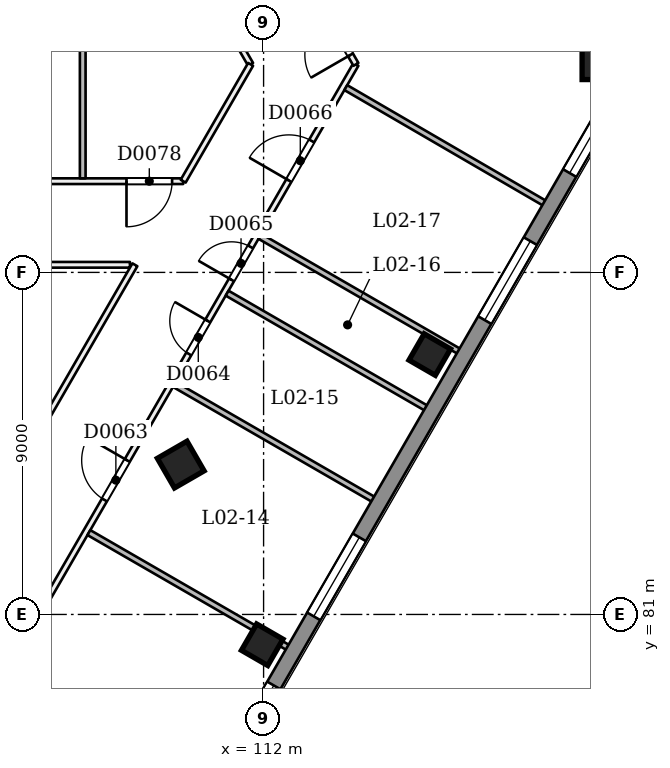
"""IFC4 building model, lengths in metres.
Left out: names, types, materials, properties, quantities, classifications, styles, units other than length and angle.
Written with IfcOpenShell. Run it as: python <this file> out.ifc"""

import sys

from ifc_helpers import new_model, si_unit, direction, frame, frame_2d, origin, origin_2d, place, context, subcontext, project, spatial, rectangle, extrude, element, fill, save


model = new_model("IFC4")
c1 = context("Model", 3, precision=1e-05, world=origin(), true_north=direction((0.0, 1.0)))
c2 = subcontext(c1, "Body", "Model", "MODEL_VIEW")
j1 = project(units=[si_unit("LENGTHUNIT", "METRE"), si_unit("PLANEANGLEUNIT", "RADIAN")], contexts=[c1])
p1 = place(None, origin())
s1 = spatial("IfcSite", under=j1, at=p1, CompositionType="ELEMENT")
p2 = place(p1, origin())
s2 = spatial("IfcBuilding", under=s1, at=p2, CompositionType="ELEMENT")
p3 = place(p2, frame((0.0, 0.0, 13.5)))
s3 = spatial("IfcBuildingStorey", under=s2, at=p3, CompositionType="ELEMENT", Elevation=13.5)
p4 = place(p3, frame((109.847, 84.896, -0.027), z_axis=(-0.022221996839, 0.038427794534, 0.999014257888), x_axis=(-0.499640913669, -0.865948222615, 0.022195340453)))
e1 = element("IfcColumn", 1, at=p4, inside=s3, PredefinedType="COLUMN", context=c2, shape_type="SweptSolid", body=[
    extrude(rectangle(XDim=0.9, YDim=0.9, at=origin_2d()), origin(), (0.0, 0.0, 1.0), 4.504),
])
for number, where, z_axis, x_axis in (
    (2, (111.964, 80.203, 0.0), (0.0, 0.0, 1.0), (0.5, 0.866, 0.0)),
    (3, (116.372, 87.838, 0.0), (0.0, 0.0, 1.0), (0.5, 0.866, 0.0)),
    (4, (120.781, 95.474, 0.0), (0.0, 0.0, 1.0), (1.745e-08, 1.0, 0.0)),
):
    element("IfcColumn", number, at=place(p3, frame(where, z_axis=z_axis, x_axis=x_axis)), inside=s3, PredefinedType="COLUMN", context=c2, shape_type="SweptSolid", body=[
        extrude(rectangle(XDim=0.8, YDim=0.8, at=origin_2d()), origin(), (0.0, 0.0, 1.0), 4.5),
    ])
p5 = place(p3, frame((86.747, 47.526, 0.0), z_axis=(0.0, 0.0, 1.0), x_axis=(0.500000085768, 0.866025354266, 0.0)))
e5 = element("IfcWall", 5, at=p5, inside=s3, PredefinedType="PARTITIONING", context=c2, shape_type="SweptSolid", body=[
    extrude(rectangle(XDim=55.365, YDim=0.15, at=frame_2d((27.682, 0.0))), origin(), (0.0, 0.0, 1.0), 4.05),
])
p6 = place(p5, frame((0.97, 0.0, 0.0)))
e6 = element("IfcOpeningElement", 6, at=p6, cuts=e5, PredefinedType="OPENING", context=c2, shape_type="SweptSolid", body=[
    extrude(rectangle(XDim=1.2, YDim=2.1, at=frame_2d((0.6, 1.05))), frame((0.0, 0.085, 0.0), z_axis=(0.0, -1.0, 0.0), x_axis=(1.0, 0.0, 0.0)), (0.0, 0.0, 1.0), 0.171),
])
p7 = place(p5, frame((11.332, 0.0, 0.0)))
e7 = element("IfcOpeningElement", 7, at=p7, cuts=e5, PredefinedType="OPENING", context=c2, shape_type="SweptSolid", body=[
    extrude(rectangle(XDim=1.2, YDim=2.1, at=frame_2d((0.6, 1.05))), frame((0.0, 0.085, 0.0), z_axis=(0.0, -1.0, 0.0), x_axis=(1.0, 0.0, 0.0)), (0.0, 0.0, 1.0), 0.171),
])
p8 = place(p5, frame((29.332, 0.0, 0.0)))
e8 = element("IfcOpeningElement", 8, at=p8, cuts=e5, PredefinedType="OPENING", context=c2, shape_type="SweptSolid", body=[
    extrude(rectangle(XDim=1.2, YDim=2.1, at=frame_2d((0.6, 1.05))), frame((0.0, 0.085, 0.0), z_axis=(0.0, -1.0, 0.0), x_axis=(1.0, 0.0, 0.0)), (0.0, 0.0, 1.0), 0.171),
])
p9 = place(p5, frame((42.132, 0.0, 0.0)))
e9 = element("IfcOpeningElement", 9, at=p9, cuts=e5, PredefinedType="OPENING", context=c2, shape_type="SweptSolid", body=[
    extrude(rectangle(XDim=1.2, YDim=2.1, at=frame_2d((0.6, 1.05))), frame((0.0, 0.085, 0.0), z_axis=(0.0, -1.0, 0.0), x_axis=(1.0, 0.0, 0.0)), (0.0, 0.0, 1.0), 0.171),
])
p10 = place(p5, frame((46.569, 0.0, 0.0)))
e10 = element("IfcOpeningElement", 10, at=p10, cuts=e5, PredefinedType="OPENING", context=c2, shape_type="SweptSolid", body=[
    extrude(rectangle(XDim=1.0, YDim=2.1, at=frame_2d((0.5, 1.05))), frame((0.0, 0.085, 0.0), z_axis=(0.0, -1.0, 0.0), x_axis=(1.0, 0.0, 0.0)), (0.0, 0.0, 1.0), 0.171),
])
p11 = place(p5, frame((48.819, 0.0, 0.0)))
e11 = element("IfcOpeningElement", 11, at=p11, cuts=e5, PredefinedType="OPENING", context=c2, shape_type="SweptSolid", body=[
    extrude(rectangle(XDim=1.0, YDim=2.1, at=frame_2d((0.5, 1.05))), frame((0.0, 0.085, 0.0), z_axis=(0.0, -1.0, 0.0), x_axis=(1.0, 0.0, 0.0)), (0.0, 0.0, 1.0), 0.171),
])
p12 = place(p5, frame((51.837, 0.0, 0.0)))
e12 = element("IfcOpeningElement", 12, at=p12, cuts=e5, PredefinedType="OPENING", context=c2, shape_type="SweptSolid", body=[
    extrude(rectangle(XDim=1.2, YDim=2.1, at=frame_2d((0.6, 1.05))), frame((0.0, 0.085, 0.0), z_axis=(0.0, -1.0, 0.0), x_axis=(1.0, 0.0, 0.0)), (0.0, 0.0, 1.0), 0.171),
])
p13 = place(p3, frame((114.43, 95.474, 0.0), z_axis=(0.0, 0.0, 1.0), x_axis=(-0.500008701212, 0.866020380079, 0.0)))
e13 = element("IfcWall", 13, at=p13, inside=s3, PredefinedType="PARTITIONING", context=c2, shape_type="SweptSolid", body=[
    extrude(rectangle(XDim=3.495, YDim=0.15, at=frame_2d((1.747, 0.0))), origin(), (0.0, 0.0, 1.0), 4.05),
])
p14 = place(p13, frame((0.288, 0.0, 0.0)))
e14 = element("IfcOpeningElement", 14, at=p14, cuts=e13, PredefinedType="OPENING", context=c2, shape_type="SweptSolid", body=[
    extrude(rectangle(XDim=1.2, YDim=2.1, at=frame_2d((0.6, 1.05))), frame((0.0, 0.085, 0.0), z_axis=(0.0, -1.0, 0.0), x_axis=(1.0, 0.0, 0.0)), (0.0, 0.0, 1.0), 0.171),
])
p15 = place(p3, frame((91.6, 90.2, 0.0), z_axis=(0.0, 0.0, 1.0), x_axis=(1.0, 0.0, 0.0)))
e15 = element("IfcWall", 15, at=p15, inside=s3, PredefinedType="PARTITIONING", context=c2, shape_type="SweptSolid", body=[
    extrude(rectangle(XDim=16.884, YDim=0.15, at=frame_2d((8.442, 0.0))), origin(), (0.0, 0.0, 1.0), 4.05),
])
p16 = place(p3, frame((108.614, 90.2, 0.0), z_axis=(0.0, 0.0, 1.0), x_axis=(-0.500000743568, -0.866024974485, 0.0)))
e16 = element("IfcWall", 16, at=p16, inside=s3, PredefinedType="PARTITIONING", context=c2, shape_type="SweptSolid", body=[
    extrude(rectangle(XDim=31.87, YDim=0.15, at=frame_2d((15.935, 0.0))), origin(), (0.0, 0.0, 1.0), 4.05),
])
p17 = place(p16, frame((7.866, 0.0, 0.0)))
e17 = element("IfcOpeningElement", 17, at=p17, cuts=e16, PredefinedType="OPENING", context=c2, shape_type="SweptSolid", body=[
    extrude(rectangle(XDim=1.2, YDim=2.1, at=frame_2d((0.6, 1.05))), frame((0.0, 0.085, 0.0), z_axis=(0.0, -1.0, 0.0), x_axis=(1.0, 0.0, 0.0)), (0.0, 0.0, 1.0), 0.171),
])
p18 = place(p16, frame((15.25, 0.0, 0.0)))
e18 = element("IfcOpeningElement", 18, at=p18, cuts=e16, PredefinedType="OPENING", context=c2, shape_type="SweptSolid", body=[
    extrude(rectangle(XDim=1.2, YDim=2.1, at=frame_2d((0.6, 1.05))), frame((0.0, 0.085, 0.0), z_axis=(0.0, -1.0, 0.0), x_axis=(1.0, 0.0, 0.0)), (0.0, 0.0, 1.0), 0.171),
])
p19 = place(p16, frame((22.536, 0.0, 0.0)))
e19 = element("IfcOpeningElement", 19, at=p19, cuts=e16, PredefinedType="OPENING", context=c2, shape_type="SweptSolid", body=[
    extrude(rectangle(XDim=1.2, YDim=2.1, at=frame_2d((0.6, 1.05))), frame((0.0, 0.085, 0.0), z_axis=(0.0, -1.0, 0.0), x_axis=(1.0, 0.0, 0.0)), (0.0, 0.0, 1.0), 0.171),
])
p20 = place(p16, frame((29.42, 0.0, 0.0)))
e20 = element("IfcOpeningElement", 20, at=p20, cuts=e16, PredefinedType="OPENING", context=c2, shape_type="SweptSolid", body=[
    extrude(rectangle(XDim=1.2, YDim=2.1, at=frame_2d((0.6, 1.05))), frame((0.0, 0.085, 0.0), z_axis=(0.0, -1.0, 0.0), x_axis=(1.0, 0.0, 0.0)), (0.0, 0.0, 1.0), 0.171),
])
p21 = place(p3, frame((109.884, 92.4, 0.0), z_axis=(0.0, 0.0, 1.0), x_axis=(-1.0, 0.0, 0.0)))
e21 = element("IfcWall", 21, at=p21, inside=s3, PredefinedType="PARTITIONING", context=c2, shape_type="SweptSolid", body=[
    extrude(rectangle(XDim=10.084, YDim=0.15, at=frame_2d((5.042, 0.0))), origin(), (0.0, 0.0, 1.0), 4.05),
])
p22 = place(p21, frame((6.062, 0.0, 0.0)))
e22 = element("IfcOpeningElement", 22, at=p22, cuts=e21, PredefinedType="OPENING", context=c2, shape_type="SweptSolid", body=[
    extrude(rectangle(XDim=1.2, YDim=2.1, at=frame_2d((0.6, 1.05))), frame((0.0, 0.085, 0.0), z_axis=(0.0, -1.0, 0.0), x_axis=(1.0, 0.0, 0.0)), (0.0, 0.0, 1.0), 0.171),
])
p23 = place(p21, frame((0.291, 0.0, 0.0)))
e23 = element("IfcOpeningElement", 23, at=p23, cuts=e21, PredefinedType="OPENING", context=c2, shape_type="SweptSolid", body=[
    extrude(rectangle(XDim=1.2, YDim=2.1, at=frame_2d((0.6, 1.05))), frame((0.0, 0.085, 0.0), z_axis=(0.0, -1.0, 0.0), x_axis=(1.0, 0.0, 0.0)), (0.0, 0.0, 1.0), 0.171),
])
p24 = place(p3, frame((109.911, 98.5, 0.0), z_axis=(0.0, 0.0, 1.0), x_axis=(0.500008701212, -0.866020380079, 0.0)))
e24 = element("IfcWall", 24, at=p24, inside=s3, PredefinedType="PARTITIONING", context=c2, shape_type="SweptSolid", body=[
    extrude(rectangle(XDim=3.495, YDim=0.15, at=frame_2d((1.747, 0.0))), origin(), (0.0, 0.0, 1.0), 4.05),
])
p25 = place(p3, frame((111.658, 95.474, 0.0), z_axis=(0.0, 0.0, 1.0), x_axis=(-0.500008260065, -0.866020634781, 0.0)))
e25 = element("IfcWall", 25, at=p25, inside=s3, PredefinedType="PARTITIONING", context=c2, shape_type="SweptSolid", body=[
    extrude(rectangle(XDim=3.549, YDim=0.15, at=frame_2d((1.775, 0.0))), origin(), (0.0, 0.0, 1.0), 4.05),
])
for number, where, z_axis, x_axis in (
    (26, (112.881, 79.991, 0.0), (0.0, 0.0, 1.0), (-0.866, 0.5, 0.0)),
    (27, (115.131, 83.888, 0.0), (0.0, 0.0, 1.0), (-0.866, 0.5, 0.0)),
):
    element("IfcWall", number, at=place(p3, frame(where, z_axis=z_axis, x_axis=x_axis)), inside=s3, PredefinedType="PARTITIONING", context=c2, shape_type="SweptSolid", body=[
        extrude(rectangle(XDim=6.325, YDim=0.15, at=frame_2d((3.163, 0.0))), origin(), (0.0, 0.0, 1.0), 4.05),
    ])
p26 = place(p3, frame((116.518, 86.291, 0.0), z_axis=(0.0, 0.0, 1.0), x_axis=(-0.866015887322, 0.500016482634, 0.0)))
e28 = element("IfcWall", 28, at=p26, inside=s3, PredefinedType="PARTITIONING", context=c2, shape_type="SweptSolid", body=[
    extrude(rectangle(XDim=6.325, YDim=0.15, at=frame_2d((3.163, 0.0))), origin(), (0.0, 0.0, 1.0), 4.05),
])
p27 = place(p3, frame((117.381, 87.786, 0.0), z_axis=(0.0, 0.0, 1.0), x_axis=(-0.866042250622, 0.499970819286, 0.0)))
e29 = element("IfcWall", 29, at=p27, inside=s3, PredefinedType="PARTITIONING", context=c2, shape_type="SweptSolid", body=[
    extrude(rectangle(XDim=6.325, YDim=0.15, at=frame_2d((3.163, 0.0))), origin(), (0.0, 0.0, 1.0), 4.05),
])
p28 = place(p3, frame((119.631, 91.683, 0.0), z_axis=(0.0, 0.0, 1.0), x_axis=(-0.864489243455, 0.502651318462, 0.0)))
e30 = element("IfcWall", 30, at=p28, inside=s3, PredefinedType="PARTITIONING", context=c2, shape_type="SweptSolid", body=[
    extrude(rectangle(XDim=6.325, YDim=0.15, at=frame_2d((3.163, 0.0))), origin(), (0.0, 0.0, 1.0), 4.05),
])
p29 = place(p3, frame((107.241, 92.475, 0.0), z_axis=(0.0, 0.0, 1.0), x_axis=(0.0, 1.0, 0.0)))
e31 = element("IfcWall", 31, at=p29, inside=s3, PredefinedType="PARTITIONING", context=c2, shape_type="SweptSolid", body=[
    extrude(rectangle(XDim=12.425, YDim=0.15, at=frame_2d((6.212, 0.0))), origin(), (0.0, 0.0, 1.0), 4.05),
])
p30 = place(p3, frame((121.762, 95.574, 0.0), z_axis=(0.0, 0.0, 1.0), x_axis=(-0.499997306052, -0.866026959131, 0.0)))
e32 = element("IfcWall", 32, at=p30, inside=s3, PredefinedType="SOLIDWALL", context=c2, shape_type="SweptSolid", body=[
    extrude(rectangle(XDim=62.87, YDim=0.4, at=frame_2d((31.435, 0.0))), origin(), (0.0, 0.0, 1.0), 4.05),
])
p31 = place(p30, frame((59.452, 0.0, 0.9)))
e33 = element("IfcOpeningElement", 33, at=p31, cuts=e32, PredefinedType="OPENING", context=c2, shape_type="SweptSolid", body=[
    extrude(rectangle(XDim=2.4, YDim=1.5, at=frame_2d((1.2, 0.75))), frame((0.0, 0.21, 0.0), z_axis=(0.0, -1.0, 0.0), x_axis=(1.0, 0.0, 0.0)), (0.0, 0.0, 1.0), 0.421),
])
p32 = place(p30, frame((54.986, 0.0, 0.9)))
e34 = element("IfcOpeningElement", 34, at=p32, cuts=e32, PredefinedType="OPENING", context=c2, shape_type="SweptSolid", body=[
    extrude(rectangle(XDim=2.4, YDim=1.5, at=frame_2d((1.2, 0.75))), frame((0.0, 0.21, 0.0), z_axis=(0.0, -1.0, 0.0), x_axis=(1.0, 0.0, 0.0)), (0.0, 0.0, 1.0), 0.421),
])
p33 = place(p30, frame((50.486, 0.0, 0.9)))
e35 = element("IfcOpeningElement", 35, at=p33, cuts=e32, PredefinedType="OPENING", context=c2, shape_type="SweptSolid", body=[
    extrude(rectangle(XDim=2.4, YDim=1.5, at=frame_2d((1.2, 0.75))), frame((0.0, 0.21, 0.0), z_axis=(0.0, -1.0, 0.0), x_axis=(1.0, 0.0, 0.0)), (0.0, 0.0, 1.0), 0.421),
])
p34 = place(p30, frame((45.986, 0.0, 0.9)))
e36 = element("IfcOpeningElement", 36, at=p34, cuts=e32, PredefinedType="OPENING", context=c2, shape_type="SweptSolid", body=[
    extrude(rectangle(XDim=2.4, YDim=1.5, at=frame_2d((1.2, 0.75))), frame((0.0, 0.21, 0.0), z_axis=(0.0, -1.0, 0.0), x_axis=(1.0, 0.0, 0.0)), (0.0, 0.0, 1.0), 0.421),
])
p35 = place(p30, frame((41.486, 0.0, 0.9)))
e37 = element("IfcOpeningElement", 37, at=p35, cuts=e32, PredefinedType="OPENING", context=c2, shape_type="SweptSolid", body=[
    extrude(rectangle(XDim=2.4, YDim=1.5, at=frame_2d((1.2, 0.75))), frame((0.0, 0.21, 0.0), z_axis=(0.0, -1.0, 0.0), x_axis=(1.0, 0.0, 0.0)), (0.0, 0.0, 1.0), 0.421),
])
p36 = place(p30, frame((36.986, 0.0, 0.9)))
e38 = element("IfcOpeningElement", 38, at=p36, cuts=e32, PredefinedType="OPENING", context=c2, shape_type="SweptSolid", body=[
    extrude(rectangle(XDim=2.4, YDim=1.5, at=frame_2d((1.2, 0.75))), frame((0.0, 0.21, 0.0), z_axis=(0.0, -1.0, 0.0), x_axis=(1.0, 0.0, 0.0)), (0.0, 0.0, 1.0), 0.421),
])
p37 = place(p30, frame((23.486, 0.0, 0.9)))
e39 = element("IfcOpeningElement", 39, at=p37, cuts=e32, PredefinedType="OPENING", context=c2, shape_type="SweptSolid", body=[
    extrude(rectangle(XDim=2.4, YDim=1.5, at=frame_2d((1.2, 0.75))), frame((0.0, 0.21, 0.0), z_axis=(0.0, -1.0, 0.0), x_axis=(1.0, 0.0, 0.0)), (0.0, 0.0, 1.0), 0.421),
])
p38 = place(p30, frame((18.986, 0.0, 0.9)))
e40 = element("IfcOpeningElement", 40, at=p38, cuts=e32, PredefinedType="OPENING", context=c2, shape_type="SweptSolid", body=[
    extrude(rectangle(XDim=2.4, YDim=1.5, at=frame_2d((1.2, 0.75))), frame((0.0, 0.21, 0.0), z_axis=(0.0, -1.0, 0.0), x_axis=(1.0, 0.0, 0.0)), (0.0, 0.0, 1.0), 0.421),
])
p39 = place(p30, frame((14.486, 0.0, 0.9)))
e41 = element("IfcOpeningElement", 41, at=p39, cuts=e32, PredefinedType="OPENING", context=c2, shape_type="SweptSolid", body=[
    extrude(rectangle(XDim=2.4, YDim=1.5, at=frame_2d((1.2, 0.75))), frame((0.0, 0.21, 0.0), z_axis=(0.0, -1.0, 0.0), x_axis=(1.0, 0.0, 0.0)), (0.0, 0.0, 1.0), 0.421),
])
p40 = place(p30, frame((5.486, 0.0, 0.9)))
e42 = element("IfcOpeningElement", 42, at=p40, cuts=e32, PredefinedType="OPENING", context=c2, shape_type="SweptSolid", body=[
    extrude(rectangle(XDim=2.4, YDim=1.5, at=frame_2d((1.2, 0.75))), frame((0.0, 0.21, 0.0), z_axis=(0.0, -1.0, 0.0), x_axis=(1.0, 0.0, 0.0)), (0.0, 0.0, 1.0), 0.421),
])
p41 = place(p30, frame((1.018, 0.0, 0.9)))
e43 = element("IfcOpeningElement", 43, at=p41, cuts=e32, PredefinedType="OPENING", context=c2, shape_type="SweptSolid", body=[
    extrude(rectangle(XDim=2.4, YDim=1.5, at=frame_2d((1.2, 0.75))), frame((0.0, 0.21, 0.0), z_axis=(0.0, -1.0, 0.0), x_axis=(1.0, 0.0, 0.0)), (0.0, 0.0, 1.0), 0.421),
])
p42 = place(p3, frame((116.262, 104.9, 0.0), z_axis=(0.0, 0.0, 1.0), x_axis=(0.50000615651, -0.866021849293, 0.0)))
e44 = element("IfcWall", 44, at=p42, inside=s3, PredefinedType="SOLIDWALL", context=c2, shape_type="SweptSolid", body=[
    extrude(rectangle(XDim=11.0, YDim=0.4, at=frame_2d((5.5, 0.0))), origin(), (0.0, 0.0, 1.0), 4.05),
])
p43 = place(p42, frame((4.3, 0.0, 0.9)))
e45 = element("IfcOpeningElement", 45, at=p43, cuts=e44, PredefinedType="OPENING", context=c2, shape_type="SweptSolid", body=[
    extrude(rectangle(XDim=2.4, YDim=1.5, at=frame_2d((1.2, 0.75))), frame((0.0, 0.21, 0.0), z_axis=(0.0, -1.0, 0.0), x_axis=(1.0, 0.0, 0.0)), (0.0, 0.0, 1.0), 0.421),
])
p44 = place(p9, origin())
e46 = element("IfcDoor", 46, at=p44, inside=s3, OperationType="SINGLE_SWING_RIGHT", PredefinedType="NOTDEFINED", context=c2, shape_type="SweptSolid", body=[
    extrude(rectangle(XDim=1.2, YDim=2.1, at=frame_2d((0.6, 1.05))), frame((0.0, 0.025, 0.0), z_axis=(0.0, -1.0, 0.0), x_axis=(1.0, 0.0, 0.0)), (0.0, 0.0, 1.0), 0.05),
])
fill(e9, e46)
p45 = place(p10, origin())
e47 = element("IfcDoor", 47, at=p45, inside=s3, OperationType="SINGLE_SWING_RIGHT", PredefinedType="NOTDEFINED", context=c2, shape_type="SweptSolid", body=[
    extrude(rectangle(XDim=1.0, YDim=2.1, at=frame_2d((0.5, 1.05))), frame((0.0, 0.025, 0.0), z_axis=(0.0, -1.0, 0.0), x_axis=(1.0, 0.0, 0.0)), (0.0, 0.0, 1.0), 0.05),
])
fill(e10, e47)
p46 = place(p11, origin())
e48 = element("IfcDoor", 48, at=p46, inside=s3, OperationType="SINGLE_SWING_LEFT", PredefinedType="NOTDEFINED", context=c2, shape_type="SweptSolid", body=[
    extrude(rectangle(XDim=1.0, YDim=2.1, at=frame_2d((0.5, 1.05))), frame((0.0, 0.025, 0.0), z_axis=(0.0, -1.0, 0.0), x_axis=(1.0, 0.0, 0.0)), (0.0, 0.0, 1.0), 0.05),
])
fill(e11, e48)
p47 = place(p12, origin())
e49 = element("IfcDoor", 49, at=p47, inside=s3, OperationType="SINGLE_SWING_LEFT", PredefinedType="NOTDEFINED", context=c2, shape_type="SweptSolid", body=[
    extrude(rectangle(XDim=1.2, YDim=2.1, at=frame_2d((0.6, 1.05))), frame((0.0, 0.025, 0.0), z_axis=(0.0, -1.0, 0.0), x_axis=(1.0, 0.0, 0.0)), (0.0, 0.0, 1.0), 0.05),
])
fill(e12, e49)
p48 = place(p14, origin())
e50 = element("IfcDoor", 50, at=p48, inside=s3, OperationType="SINGLE_SWING_LEFT", PredefinedType="NOTDEFINED", context=c2, shape_type="SweptSolid", body=[
    extrude(rectangle(XDim=1.2, YDim=2.1, at=frame_2d((0.6, 1.05))), frame((0.0, 0.025, 0.0), z_axis=(0.0, -1.0, 0.0), x_axis=(1.0, 0.0, 0.0)), (0.0, 0.0, 1.0), 0.05),
])
fill(e14, e50)
p49 = place(p23, origin())
e51 = element("IfcDoor", 51, at=p49, inside=s3, OperationType="SINGLE_SWING_RIGHT", PredefinedType="NOTDEFINED", context=c2, shape_type="SweptSolid", body=[
    extrude(rectangle(XDim=1.2, YDim=2.1, at=frame_2d((0.6, 1.05))), frame((0.0, 0.025, 0.0), z_axis=(0.0, -1.0, 0.0), x_axis=(1.0, 0.0, 0.0)), (0.0, 0.0, 1.0), 0.05),
])
fill(e23, e51)
p50 = place(p38, origin())
e52 = element("IfcWindow", 52, at=p50, inside=s3, PartitioningType="SINGLE_PANEL", PredefinedType="WINDOW", context=c2, shape_type="SweptSolid", body=[
    extrude(rectangle(XDim=2.4, YDim=1.5, at=frame_2d((1.2, 0.75))), frame((0.0, 0.03, 0.0), z_axis=(0.0, -1.0, 0.0), x_axis=(1.0, 0.0, 0.0)), (0.0, 0.0, 1.0), 0.06),
])
fill(e40, e52)
p51 = place(p39, origin())
e53 = element("IfcWindow", 53, at=p51, inside=s3, PartitioningType="SINGLE_PANEL", PredefinedType="WINDOW", context=c2, shape_type="SweptSolid", body=[
    extrude(rectangle(XDim=2.4, YDim=1.5, at=frame_2d((1.2, 0.75))), frame((0.0, 0.03, 0.0), z_axis=(0.0, -1.0, 0.0), x_axis=(1.0, 0.0, 0.0)), (0.0, 0.0, 1.0), 0.06),
])
fill(e41, e53)
p52 = place(p40, origin())
e54 = element("IfcWindow", 54, at=p52, inside=s3, PartitioningType="SINGLE_PANEL", PredefinedType="WINDOW", context=c2, shape_type="SweptSolid", body=[
    extrude(rectangle(XDim=2.4, YDim=1.5, at=frame_2d((1.2, 0.75))), frame((0.0, 0.03, 0.0), z_axis=(0.0, -1.0, 0.0), x_axis=(1.0, 0.0, 0.0)), (0.0, 0.0, 1.0), 0.06),
])
fill(e42, e54)
p53 = place(p41, origin())
e55 = element("IfcWindow", 55, at=p53, inside=s3, PartitioningType="SINGLE_PANEL", PredefinedType="WINDOW", context=c2, shape_type="SweptSolid", body=[
    extrude(rectangle(XDim=2.4, YDim=1.5, at=frame_2d((1.2, 0.75))), frame((0.0, 0.03, 0.0), z_axis=(0.0, -1.0, 0.0), x_axis=(1.0, 0.0, 0.0)), (0.0, 0.0, 1.0), 0.06),
])
fill(e43, e55)
save(model, sys.argv[1])
